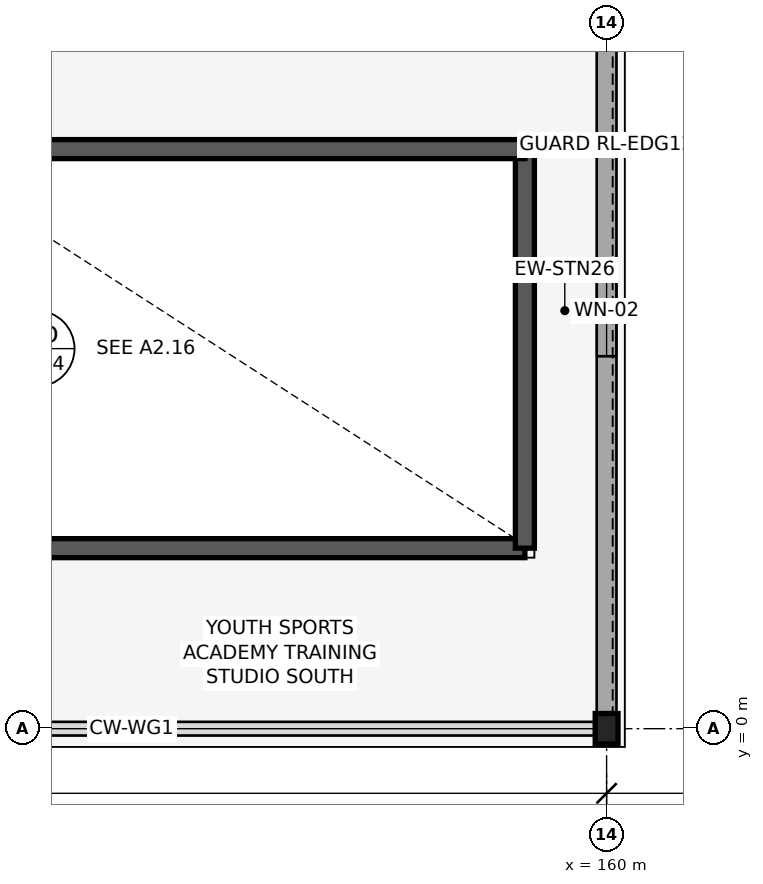
"""IFC4 building model, lengths in metres.
Left out: names, types, materials, properties, quantities, classifications, styles, units other than length and angle.
Written with IfcOpenShell. Run it as: python <this file> out.ifc"""

import sys

from ifc_helpers import new_model, si_unit, direction, frame, frame_2d, origin, origin_2d, place, context, subcontext, project, spatial, rectangle, i_section, extrude, element, fill, save


model = new_model("IFC4")
c1 = context("Model", 3, precision=1e-05, world=origin(), true_north=direction((0.0, 1.0)))
c2 = subcontext(c1, "Body", "Model", "MODEL_VIEW")
j1 = project(units=[si_unit("LENGTHUNIT", "METRE"), si_unit("PLANEANGLEUNIT", "RADIAN")], contexts=[c1])
p1 = place(None, origin())
s1 = spatial("IfcSite", under=j1, at=p1, CompositionType="ELEMENT")
p2 = place(p1, origin())
s2 = spatial("IfcBuilding", under=s1, at=p2, CompositionType="ELEMENT")
p3 = place(p2, frame((0.0, 0.0, 10.6)))
s3 = spatial("IfcBuildingStorey", under=s2, at=p3, CompositionType="ELEMENT", Elevation=10.6)
p4 = place(p3, frame((160.0, 0.0, 0.0), z_axis=(0.0, 0.0, 1.0), x_axis=(1.0, 0.0, 0.0)))
e1 = element("IfcColumn", 1, at=p4, inside=s3, PredefinedType="COLUMN", context=c2, shape_type="SweptSolid", body=[
    extrude(i_section(OverallWidth=0.3, OverallDepth=0.4, WebThickness=0.013, FlangeThickness=0.024, FilletRadius=0.027, at=origin_2d()), origin(), (0.0, 0.0, 1.0), 5.0),
])
p5 = place(p3, frame((160.0, 0.197, 0.0), z_axis=(0.0, 0.0, 1.0), x_axis=(0.0, 1.0, 0.0)))
e2 = element("IfcWall", 2, at=p5, inside=s3, PredefinedType="STANDARD", context=c2, shape_type="SweptSolid", body=[
    extrude(rectangle(XDim=10.606, YDim=0.26, at=frame_2d((5.303, 0.0))), origin(), (0.0, 0.0, 1.0), 4.1),
])
p6 = place(p5, frame((4.703, 0.0, 0.95)))
e3 = element("IfcOpeningElement", 3, at=p6, cuts=e2, PredefinedType="OPENING", context=c2, shape_type="SweptSolid", body=[
    extrude(rectangle(XDim=1.2, YDim=1.6, at=frame_2d((0.6, 0.8))), frame((0.0, 0.14, 0.0), z_axis=(0.0, -1.0, 0.0), x_axis=(1.0, 0.0, 0.0)), (0.0, 0.0, 1.0), 0.28),
])
p7 = place(p3, frame((148.475, 2.375, 0.0), z_axis=(0.0, 0.0, 1.0), x_axis=(1.0, 0.0, 0.0)))
e4 = element("IfcWall", 4, at=p7, inside=s3, PredefinedType="SHEAR", context=c2, shape_type="SweptSolid", body=[
    extrude(rectangle(XDim=10.45, YDim=0.25, at=frame_2d((5.225, 0.0))), origin(), (0.0, 0.0, 1.0), 3.2),
])
p8 = place(p3, frame((158.925, 2.375, 0.0), z_axis=(0.0, 0.0, 1.0), x_axis=(0.0, 1.0, 0.0)))
e5 = element("IfcWall", 5, at=p8, inside=s3, PredefinedType="SHEAR", context=c2, shape_type="SweptSolid", body=[
    extrude(rectangle(XDim=5.25, YDim=0.25, at=frame_2d((2.625, 0.0))), origin(), (0.0, 0.0, 1.0), 3.2),
])
p9 = place(p3, frame((158.925, 7.625, 0.0), z_axis=(0.0, 0.0, 1.0), x_axis=(-1.0, 0.0, 0.0)))
e6 = element("IfcWall", 6, at=p9, inside=s3, PredefinedType="SHEAR", context=c2, shape_type="SweptSolid", body=[
    extrude(rectangle(XDim=10.45, YDim=0.25, at=frame_2d((5.225, 0.0))), origin(), (0.0, 0.0, 1.0), 3.2),
])
p10 = place(p6, origin())
e7 = element("IfcWindow", 7, at=p10, inside=s3, PartitioningType="SINGLE_PANEL", PredefinedType="WINDOW", context=c2, shape_type="SweptSolid", body=[
    extrude(rectangle(XDim=1.2, YDim=1.6, at=frame_2d((0.6, 0.8))), frame((0.0, 0.03, 0.0), z_axis=(0.0, -1.0, 0.0), x_axis=(1.0, 0.0, 0.0)), (0.0, 0.0, 1.0), 0.06),
])
fill(e3, e7)
save(model, sys.argv[1])
